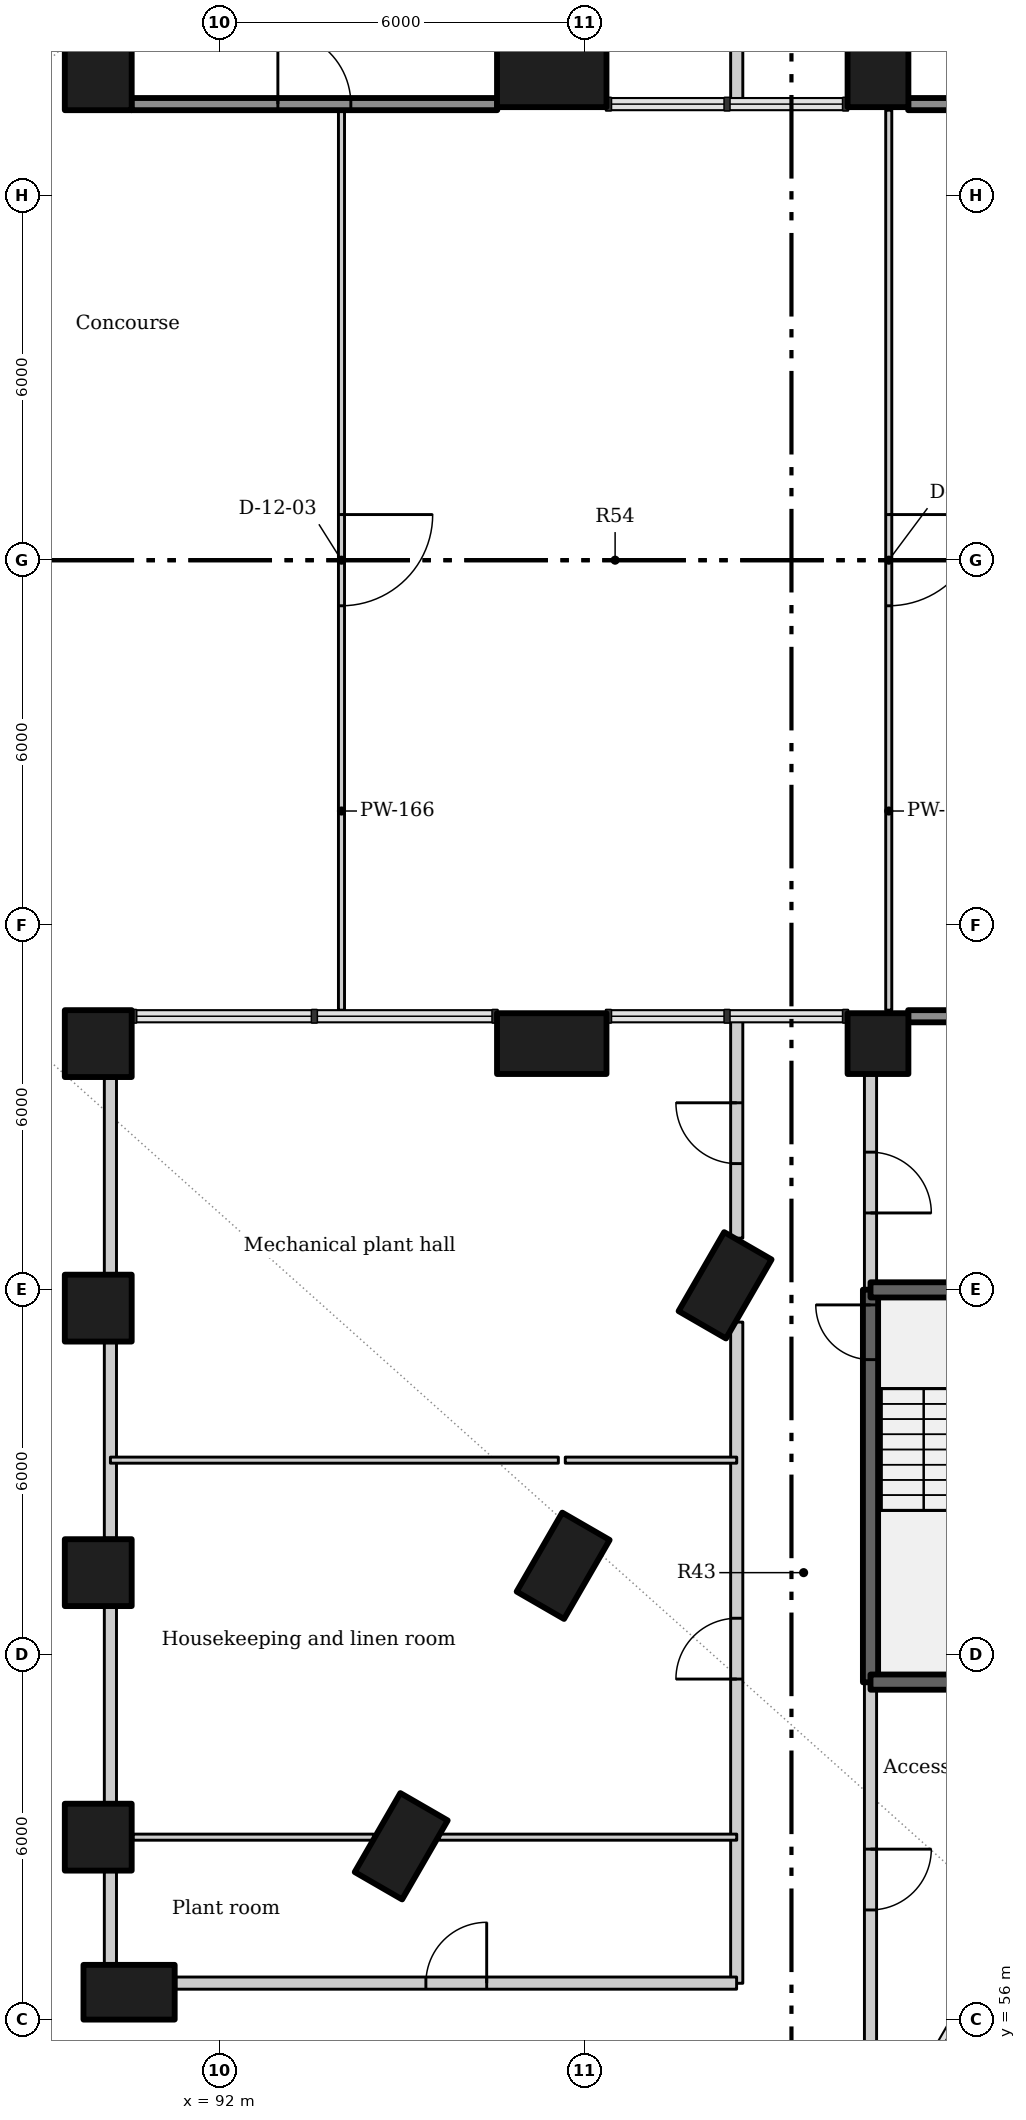
"""IFC4 building model, lengths in metres.
Left out: names, types, materials, properties, quantities, classifications, styles, units other than length and angle.
Written with IfcOpenShell. Run it as: python <this file> out.ifc"""

import sys

from ifc_helpers import new_model, si_unit, direction, frame, frame_2d, origin, origin_2d, place, context, subcontext, project, spatial, rectangle, extrude, element, fill, save


model = new_model("IFC4")
c1 = context("Model", 3, precision=1e-05, world=origin(), true_north=direction((0.0, 1.0)))
c2 = subcontext(c1, "Body", "Model", "MODEL_VIEW")
j1 = project(units=[si_unit("LENGTHUNIT", "METRE"), si_unit("PLANEANGLEUNIT", "RADIAN")], contexts=[c1])
p1 = place(None, origin())
s1 = spatial("IfcSite", under=j1, at=p1, CompositionType="ELEMENT")
p2 = place(p1, origin())
s2 = spatial("IfcBuilding", under=s1, at=p2, CompositionType="ELEMENT")
p3 = place(p2, origin())
s3 = spatial("IfcBuildingStorey", under=s2, at=p3, CompositionType="ELEMENT", Elevation=0.0)
for number, where, z_axis, x_axis in (
    (1, (90.507, 56.45, -1.8), (0.0, 0.0, 1.0), (1.0, 0.0, 0.0)),
    (2, (94.982, 58.851, -1.8), (0.0, 0.0, 1.0), (0.5, 0.866, 0.0)),
    (3, (97.646, 63.463, -1.8), (0.0, 0.0, 1.0), (0.5, 0.866, 0.0)),
    (4, (100.308, 68.075, -1.8), (0.0, 0.0, 1.0), (0.5, 0.866, 0.0)),
):
    element("IfcColumn", number, at=place(p3, frame(where, z_axis=z_axis, x_axis=x_axis)), inside=s3, PredefinedType="COLUMN", context=c2, shape_type="SweptSolid", body=[
        extrude(rectangle(XDim=1.5, YDim=0.9, at=origin_2d()), origin(), (0.0, 0.0, 1.0), 8.4),
    ])
for number, where, z_axis, x_axis in (
    (5, (90.0, 59.0, -1.8), (0.0, 0.0, 1.0), (0.0, 1.0, 0.0)),
    (6, (90.0, 63.35, -1.8), (0.0, 0.0, 1.0), (0.0, 1.0, 0.0)),
    (7, (90.0, 67.7, -1.8), (0.0, 0.0, 1.0), (0.0, 1.0, 0.0)),
    (8, (90.0, 72.05, -1.8), (0.0, 0.0, 1.0), (0.0, 1.0, 0.0)),
    (9, (90.0, 87.95, -1.8), (0.0, 0.0, 1.0), (0.0, 1.0, 0.0)),
):
    element("IfcColumn", number, at=place(p3, frame(where, z_axis=z_axis, x_axis=x_axis)), inside=s3, PredefinedType="COLUMN", context=c2, shape_type="SweptSolid", body=[
        extrude(rectangle(XDim=1.1, YDim=1.1, at=origin_2d()), origin(), (0.0, 0.0, 1.0), 8.4),
    ])
for number, where, z_axis, x_axis in (
    (10, (97.458, 87.95, -1.8), (0.0, 0.0, 1.0), (1.0, 0.0, 0.0)),
    (11, (97.458, 72.05, -1.8), (0.0, 0.0, 1.0), (1.0, 0.0, 0.0)),
):
    element("IfcColumn", number, at=place(p3, frame(where, z_axis=z_axis, x_axis=x_axis)), inside=s3, PredefinedType="COLUMN", context=c2, shape_type="SweptSolid", body=[
        extrude(rectangle(XDim=1.8, YDim=1.0, at=origin_2d()), origin(), (0.0, 0.0, 1.0), 8.4),
    ])
for number, where, z_axis, x_axis in (
    (12, (102.823, 87.95, -1.8), (0.0, 0.0, 1.0), (1.0, 0.0, 0.0)),
    (13, (102.823, 72.05, -1.8), (0.0, 0.0, 1.0), (1.0, 0.0, 0.0)),
):
    element("IfcColumn", number, at=place(p3, frame(where, z_axis=z_axis, x_axis=x_axis)), inside=s3, PredefinedType="COLUMN", context=c2, shape_type="SweptSolid", body=[
        extrude(rectangle(XDim=1.0, YDim=1.0, at=origin_2d()), origin(), (0.0, 0.0, 1.0), 8.4),
    ])
p4 = place(p3, frame((107.413, 72.5, 0.0), z_axis=(0.0, 0.0, 1.0), x_axis=(-1.0, 0.0, 0.0)))
e14 = element("IfcWall", 14, at=p4, inside=s3, PredefinedType="SOLIDWALL", context=c2, shape_type="SweptSolid", body=[
    extrude(rectangle(XDim=4.094, YDim=0.2, at=frame_2d((2.047, 0.0))), origin(), (0.0, 0.0, 1.0), 5.4),
])
p5 = place(p4, frame((0.847, 0.0, 0.0)))
e15 = element("IfcOpeningElement", 15, at=p5, cuts=e14, PredefinedType="OPENING", context=c2, shape_type="SweptSolid", body=[
    extrude(rectangle(XDim=2.4, YDim=2.7, at=frame_2d((1.2, 1.35))), frame((0.0, 0.11, 0.0), z_axis=(0.0, -1.0, 0.0), x_axis=(1.0, 0.0, 0.0)), (0.0, 0.0, 1.0), 0.22),
])
p6 = place(p3, frame((90.546, 87.5, 0.0), z_axis=(0.0, 0.0, 1.0), x_axis=(1.0, 0.0, 0.0)))
e16 = element("IfcWall", 16, at=p6, inside=s3, PredefinedType="SOLIDWALL", context=c2, shape_type="SweptSolid", body=[
    extrude(rectangle(XDim=6.016, YDim=0.2, at=frame_2d((3.008, 0.0))), origin(), (0.0, 0.0, 1.0), 5.4),
])
p7 = place(p6, frame((2.408, 0.0, 0.0)))
e17 = element("IfcOpeningElement", 17, at=p7, cuts=e16, PredefinedType="OPENING", context=c2, shape_type="SweptSolid", body=[
    extrude(rectangle(XDim=1.2, YDim=2.4, at=frame_2d((0.6, 1.2))), frame((0.0, 0.11, 0.0), z_axis=(0.0, -1.0, 0.0), x_axis=(1.0, 0.0, 0.0)), (0.0, 0.0, 1.0), 0.22),
])
p8 = place(p3, frame((103.319, 87.5, 0.0), z_axis=(0.0, 0.0, 1.0), x_axis=(1.0, 0.0, 0.0)))
e18 = element("IfcWall", 18, at=p8, inside=s3, PredefinedType="SOLIDWALL", context=c2, shape_type="SweptSolid", body=[
    extrude(rectangle(XDim=4.094, YDim=0.2, at=frame_2d((2.047, 0.0))), origin(), (0.0, 0.0, 1.0), 5.4),
])
p9 = place(p8, frame((0.847, 0.0, 0.0)))
e19 = element("IfcOpeningElement", 19, at=p9, cuts=e18, PredefinedType="OPENING", context=c2, shape_type="SweptSolid", body=[
    extrude(rectangle(XDim=2.4, YDim=2.7, at=frame_2d((1.2, 1.35))), frame((0.0, 0.11, 0.0), z_axis=(0.0, -1.0, 0.0), x_axis=(1.0, 0.0, 0.0)), (0.0, 0.0, 1.0), 0.22),
])
p10 = place(p3, frame((102.7, 61.547, -1.8), z_axis=(0.0, 0.0, 1.0), x_axis=(0.0, 1.0, 0.0)))
e20 = element("IfcWall", 20, at=p10, inside=s3, PredefinedType="SHEAR", context=c2, shape_type="SweptSolid", body=[
    extrude(rectangle(XDim=6.456, YDim=0.25, at=frame_2d((3.228, 0.0))), origin(), (0.0, 0.0, 1.0), 8.1),
])
p11 = place(p10, frame((5.306, 0.0, 1.8)))
e21 = element("IfcOpeningElement", 21, at=p11, cuts=e20, PredefinedType="OPENING", context=c2, shape_type="SweptSolid", body=[
    extrude(rectangle(XDim=0.9, YDim=2.1, at=frame_2d((0.45, 1.05))), frame((0.0, 0.135, 0.0), z_axis=(0.0, -1.0, 0.0), x_axis=(1.0, 0.0, 0.0)), (0.0, 0.0, 1.0), 0.27),
])
p12 = place(p3, frame((102.7, 61.553, 0.0), z_axis=(0.0, 0.0, 1.0), x_axis=(0.0, -1.0, 0.0)))
e22 = element("IfcWall", 22, at=p12, inside=s3, PredefinedType="PARTITIONING", context=c2, shape_type="SweptSolid", body=[
    extrude(rectangle(XDim=6.499, YDim=0.2, at=frame_2d((3.249, 0.0))), origin(), (0.0, 0.0, 1.0), 6.3),
])
p13 = place(p12, frame((2.75, 0.0, 0.0)))
e23 = element("IfcOpeningElement", 23, at=p13, cuts=e22, PredefinedType="OPENING", context=c2, shape_type="SweptSolid", body=[
    extrude(rectangle(XDim=1.0, YDim=2.1, at=frame_2d((0.5, 1.05))), frame((0.0, 0.11, 0.0), z_axis=(0.0, -1.0, 0.0), x_axis=(1.0, 0.0, 0.0)), (0.0, 0.0, 1.0), 0.22),
])
p14 = place(p3, frame((102.7, 71.533, 0.0), z_axis=(0.0, 0.0, 1.0), x_axis=(0.0, -1.0, 0.0)))
e24 = element("IfcWall", 24, at=p14, inside=s3, PredefinedType="PARTITIONING", context=c2, shape_type="SweptSolid", body=[
    extrude(rectangle(XDim=3.536, YDim=0.2, at=frame_2d((1.768, 0.0))), origin(), (0.0, 0.0, 1.0), 6.3),
])
p15 = place(p14, frame((1.268, 0.0, 0.0)))
e25 = element("IfcOpeningElement", 25, at=p15, cuts=e24, PredefinedType="OPENING", context=c2, shape_type="SweptSolid", body=[
    extrude(rectangle(XDim=1.0, YDim=2.1, at=frame_2d((0.5, 1.05))), frame((0.0, 0.11, 0.0), z_axis=(0.0, -1.0, 0.0), x_axis=(1.0, 0.0, 0.0)), (0.0, 0.0, 1.0), 0.22),
])
p16 = place(p3, frame((100.5, 56.597, 0.0), z_axis=(0.0, 0.0, 1.0), x_axis=(0.0, 1.0, 0.0)))
e26 = element("IfcWall", 26, at=p16, inside=s3, PredefinedType="PARTITIONING", context=c2, shape_type="SweptSolid", body=[
    extrude(rectangle(XDim=10.873, YDim=0.2, at=frame_2d((5.437, 0.0))), origin(), (0.0, 0.0, 1.0), 6.3),
])
p17 = place(p16, frame((5.003, 0.0, 0.0)))
e27 = element("IfcOpeningElement", 27, at=p17, cuts=e26, PredefinedType="OPENING", context=c2, shape_type="SweptSolid", body=[
    extrude(rectangle(XDim=1.0, YDim=2.1, at=frame_2d((0.5, 1.05))), frame((0.0, 0.11, 0.0), z_axis=(0.0, -1.0, 0.0), x_axis=(1.0, 0.0, 0.0)), (0.0, 0.0, 1.0), 0.22),
])
p18 = place(p3, frame((100.5, 68.851, 0.0), z_axis=(0.0, 0.0, 1.0), x_axis=(0.0, 1.0, 0.0)))
e28 = element("IfcWall", 28, at=p18, inside=s3, PredefinedType="PARTITIONING", context=c2, shape_type="SweptSolid", body=[
    extrude(rectangle(XDim=3.569, YDim=0.2, at=frame_2d((1.785, 0.0))), origin(), (0.0, 0.0, 1.0), 5.53),
])
p19 = place(p18, frame((1.226, 0.0, 0.0)))
e29 = element("IfcOpeningElement", 29, at=p19, cuts=e28, PredefinedType="OPENING", context=c2, shape_type="SweptSolid", body=[
    extrude(rectangle(XDim=1.0, YDim=2.1, at=frame_2d((0.5, 1.05))), frame((0.0, 0.11, 0.0), z_axis=(0.0, -1.0, 0.0), x_axis=(1.0, 0.0, 0.0)), (0.0, 0.0, 1.0), 0.22),
])
p20 = place(p3, frame((100.5, 87.58, 0.0), z_axis=(0.0, 0.0, 1.0), x_axis=(0.0, 1.0, 0.0)))
e30 = element("IfcWall", 30, at=p20, inside=s3, PredefinedType="PARTITIONING", context=c2, shape_type="SweptSolid", body=[
    extrude(rectangle(XDim=3.569, YDim=0.2, at=frame_2d((1.785, 0.0))), origin(), (0.0, 0.0, 1.0), 5.53),
])
p21 = place(p20, frame((1.343, 0.0, 0.0)))
e31 = element("IfcOpeningElement", 31, at=p21, cuts=e30, PredefinedType="OPENING", context=c2, shape_type="SweptSolid", body=[
    extrude(rectangle(XDim=1.0, YDim=2.1, at=frame_2d((0.5, 1.05))), frame((0.0, 0.11, 0.0), z_axis=(0.0, -1.0, 0.0), x_axis=(1.0, 0.0, 0.0)), (0.0, 0.0, 1.0), 0.22),
])
p22 = place(p3, frame((90.2, 56.917, 0.0), z_axis=(0.0, 0.0, 1.0), x_axis=(0.0, 1.0, 0.0)))
e32 = element("IfcWall", 32, at=p22, inside=s3, PredefinedType="PARTITIONING", context=c2, shape_type="SweptSolid", body=[
    extrude(rectangle(XDim=1.516, YDim=0.2, at=frame_2d((0.758, 0.0))), origin(), (0.0, 0.0, 1.0), 6.3),
])
for number, where, z_axis, x_axis in (
    (33, (90.2, 59.567, 0.0), (0.0, 0.0, 1.0), (0.0, 1.0, 0.0)),
    (34, (90.2, 63.917, 0.0), (0.0, 0.0, 1.0), (0.0, 1.0, 0.0)),
):
    element("IfcWall", number, at=place(p3, frame(where, z_axis=z_axis, x_axis=x_axis)), inside=s3, PredefinedType="PARTITIONING", context=c2, shape_type="SweptSolid", body=[
        extrude(rectangle(XDim=3.216, YDim=0.2, at=frame_2d((1.608, 0.0))), origin(), (0.0, 0.0, 1.0), 5.53),
    ])
p23 = place(p3, frame((90.2, 68.267, 0.0), z_axis=(0.0, 0.0, 1.0), x_axis=(0.0, 1.0, 0.0)))
e35 = element("IfcWall", 35, at=p23, inside=s3, PredefinedType="PARTITIONING", context=c2, shape_type="SweptSolid", body=[
    extrude(rectangle(XDim=3.216, YDim=0.2, at=frame_2d((1.608, 0.0))), origin(), (0.0, 0.0, 1.0), 5.53),
])
p24 = place(p3, frame((91.274, 56.6, 0.0), z_axis=(0.0, 0.0, 1.0), x_axis=(1.0, 0.0, 0.0)))
e36 = element("IfcWall", 36, at=p24, inside=s3, PredefinedType="PARTITIONING", context=c2, shape_type="SweptSolid", body=[
    extrude(rectangle(XDim=9.224, YDim=0.2, at=frame_2d((4.612, 0.0))), origin(), (0.0, 0.0, 1.0), 6.3),
])
p25 = place(p24, frame((4.114, 0.0, 0.0)))
e37 = element("IfcOpeningElement", 37, at=p25, cuts=e36, PredefinedType="OPENING", context=c2, shape_type="SweptSolid", body=[
    extrude(rectangle(XDim=1.0, YDim=2.1, at=frame_2d((0.5, 1.05))), frame((0.0, 0.11, 0.0), z_axis=(0.0, -1.0, 0.0), x_axis=(1.0, 0.0, 0.0)), (0.0, 0.0, 1.0), 0.22),
])
for number, where, z_axis, x_axis in (
    (38, (102.7, 68.0, -1.8), (0.0, 0.0, 1.0), (1.0, 0.0, 0.0)),
    (39, (102.7, 61.55, -1.8), (0.0, 0.0, 1.0), (1.0, 0.0, 0.0)),
):
    element("IfcWall", number, at=place(p3, frame(where, z_axis=z_axis, x_axis=x_axis)), inside=s3, PredefinedType="SHEAR", context=c2, shape_type="SweptSolid", body=[
        extrude(rectangle(XDim=3.45, YDim=0.25, at=frame_2d((1.725, 0.0))), origin(), (0.0, 0.0, 1.0), 8.1),
    ])
p26 = place(p3, frame((90.2, 65.2, 0.0), z_axis=(0.0, 0.0, 1.0), x_axis=(1.0, 0.0, 0.0)))
e40 = element("IfcWall", 40, at=p26, inside=s3, PredefinedType="PARTITIONING", context=c2, shape_type="SweptSolid", body=[
    extrude(rectangle(XDim=7.366, YDim=0.1, at=frame_2d((3.683, 0.0))), origin(), (0.0, 0.0, 1.0), 6.3),
])
p27 = place(p3, frame((97.68, 65.2, 0.0), z_axis=(0.0, 0.0, 1.0), x_axis=(1.0, 0.0, 0.0)))
e41 = element("IfcWall", 41, at=p27, inside=s3, PredefinedType="PARTITIONING", context=c2, shape_type="SweptSolid", body=[
    extrude(rectangle(XDim=2.82, YDim=0.1, at=frame_2d((1.41, 0.0))), origin(), (0.0, 0.0, 1.0), 5.38),
])
p28 = place(p3, frame((90.57, 59.0, 0.0), z_axis=(0.0, 0.0, 1.0), x_axis=(1.0, 0.0, 0.0)))
e42 = element("IfcWall", 42, at=p28, inside=s3, PredefinedType="PARTITIONING", context=c2, shape_type="SweptSolid", body=[
    extrude(rectangle(XDim=3.956, YDim=0.1, at=frame_2d((1.978, 0.0))), origin(), (0.0, 0.0, 1.0), 6.3),
])
p29 = place(p3, frame((95.612, 59.0, 0.0), z_axis=(0.0, 0.0, 1.0), x_axis=(1.0, 0.0, 0.0)))
e43 = element("IfcWall", 43, at=p29, inside=s3, PredefinedType="PARTITIONING", context=c2, shape_type="SweptSolid", body=[
    extrude(rectangle(XDim=4.888, YDim=0.1, at=frame_2d((2.444, 0.0))), origin(), (0.0, 0.0, 1.0), 6.3),
])
p30 = place(p3, frame((94.0, 87.4, 0.0), z_axis=(0.0, 0.0, 1.0), x_axis=(0.0, -1.0, 0.0)))
e44 = element("IfcWall", 44, at=p30, inside=s3, PredefinedType="PARTITIONING", context=c2, shape_type="SweptSolid", body=[
    extrude(rectangle(XDim=14.8, YDim=0.1, at=frame_2d((7.4, 0.0))), origin(), (0.0, 0.0, 1.0), 6.3),
])
p31 = place(p30, frame((6.65, 0.0, 0.0)))
e45 = element("IfcOpeningElement", 45, at=p31, cuts=e44, PredefinedType="OPENING", context=c2, shape_type="SweptSolid", body=[
    extrude(rectangle(XDim=1.5, YDim=2.1, at=frame_2d((0.75, 1.05))), frame((0.0, 0.06, 0.0), z_axis=(0.0, -1.0, 0.0), x_axis=(1.0, 0.0, 0.0)), (0.0, 0.0, 1.0), 0.12),
])
p32 = place(p3, frame((103.0, 87.4, 0.0), z_axis=(0.0, 0.0, 1.0), x_axis=(0.0, -1.0, 0.0)))
e46 = element("IfcWall", 46, at=p32, inside=s3, PredefinedType="PARTITIONING", context=c2, shape_type="SweptSolid", body=[
    extrude(rectangle(XDim=14.8, YDim=0.1, at=frame_2d((7.4, 0.0))), origin(), (0.0, 0.0, 1.0), 6.3),
])
p33 = place(p32, frame((6.65, 0.0, 0.0)))
e47 = element("IfcOpeningElement", 47, at=p33, cuts=e46, PredefinedType="OPENING", context=c2, shape_type="SweptSolid", body=[
    extrude(rectangle(XDim=1.5, YDim=2.1, at=frame_2d((0.75, 1.05))), frame((0.0, 0.06, 0.0), z_axis=(0.0, -1.0, 0.0), x_axis=(1.0, 0.0, 0.0)), (0.0, 0.0, 1.0), 0.12),
])
p34 = place(p7, origin())
e48 = element("IfcDoor", 48, at=p34, inside=s3, OperationType="SINGLE_SWING_LEFT", PredefinedType="DOOR", context=c2, shape_type="SweptSolid", body=[
    extrude(rectangle(XDim=1.2, YDim=2.4, at=frame_2d((0.6, 1.2))), frame((0.0, 0.025, 0.0), z_axis=(0.0, -1.0, 0.0), x_axis=(1.0, 0.0, 0.0)), (0.0, 0.0, 1.0), 0.05),
])
fill(e17, e48)
p35 = place(p11, origin())
e49 = element("IfcDoor", 49, at=p35, inside=s3, OperationType="SINGLE_SWING_RIGHT", PredefinedType="DOOR", context=c2, shape_type="SweptSolid", body=[
    extrude(rectangle(XDim=0.9, YDim=2.1, at=frame_2d((0.45, 1.05))), frame((0.0, 0.025, 0.0), z_axis=(0.0, -1.0, 0.0), x_axis=(1.0, 0.0, 0.0)), (0.0, 0.0, 1.0), 0.05),
])
fill(e21, e49)
p36 = place(p15, origin())
e50 = element("IfcDoor", 50, at=p36, inside=s3, OperationType="SINGLE_SWING_RIGHT", PredefinedType="DOOR", context=c2, shape_type="SweptSolid", body=[
    extrude(rectangle(XDim=1.0, YDim=2.1, at=frame_2d((0.5, 1.05))), frame((0.0, 0.025, 0.0), z_axis=(0.0, -1.0, 0.0), x_axis=(1.0, 0.0, 0.0)), (0.0, 0.0, 1.0), 0.05),
])
fill(e25, e50)
p37 = place(p13, origin())
e51 = element("IfcDoor", 51, at=p37, inside=s3, OperationType="SINGLE_SWING_LEFT", PredefinedType="DOOR", context=c2, shape_type="SweptSolid", body=[
    extrude(rectangle(XDim=1.0, YDim=2.1, at=frame_2d((0.5, 1.05))), frame((0.0, 0.025, 0.0), z_axis=(0.0, -1.0, 0.0), x_axis=(1.0, 0.0, 0.0)), (0.0, 0.0, 1.0), 0.05),
])
fill(e23, e51)
p38 = place(p19, origin())
e52 = element("IfcDoor", 52, at=p38, inside=s3, OperationType="SINGLE_SWING_RIGHT", PredefinedType="DOOR", context=c2, shape_type="SweptSolid", body=[
    extrude(rectangle(XDim=1.0, YDim=2.1, at=frame_2d((0.5, 1.05))), frame((0.0, 0.025, 0.0), z_axis=(0.0, -1.0, 0.0), x_axis=(1.0, 0.0, 0.0)), (0.0, 0.0, 1.0), 0.05),
])
fill(e29, e52)
p39 = place(p17, origin())
e53 = element("IfcDoor", 53, at=p39, inside=s3, OperationType="SINGLE_SWING_LEFT", PredefinedType="DOOR", context=c2, shape_type="SweptSolid", body=[
    extrude(rectangle(XDim=1.0, YDim=2.1, at=frame_2d((0.5, 1.05))), frame((0.0, 0.025, 0.0), z_axis=(0.0, -1.0, 0.0), x_axis=(1.0, 0.0, 0.0)), (0.0, 0.0, 1.0), 0.05),
])
fill(e27, e53)
p40 = place(p25, origin())
e54 = element("IfcDoor", 54, at=p40, inside=s3, OperationType="SINGLE_SWING_RIGHT", PredefinedType="DOOR", context=c2, shape_type="SweptSolid", body=[
    extrude(rectangle(XDim=1.0, YDim=2.1, at=frame_2d((0.5, 1.05))), frame((0.0, 0.025, 0.0), z_axis=(0.0, -1.0, 0.0), x_axis=(1.0, 0.0, 0.0)), (0.0, 0.0, 1.0), 0.05),
])
fill(e37, e54)
p41 = place(p31, origin())
e55 = element("IfcDoor", 55, at=p41, inside=s3, OperationType="DOUBLE_DOOR_SINGLE_SWING", PredefinedType="DOOR", context=c2, shape_type="SweptSolid", body=[
    extrude(rectangle(XDim=1.5, YDim=2.1, at=frame_2d((0.75, 1.05))), frame((0.0, 0.025, 0.0), z_axis=(0.0, -1.0, 0.0), x_axis=(1.0, 0.0, 0.0)), (0.0, 0.0, 1.0), 0.05),
])
fill(e45, e55)
p42 = place(p33, origin())
e56 = element("IfcDoor", 56, at=p42, inside=s3, OperationType="DOUBLE_DOOR_SINGLE_SWING", PredefinedType="DOOR", context=c2, shape_type="SweptSolid", body=[
    extrude(rectangle(XDim=1.5, YDim=2.1, at=frame_2d((0.75, 1.05))), frame((0.0, 0.025, 0.0), z_axis=(0.0, -1.0, 0.0), x_axis=(1.0, 0.0, 0.0)), (0.0, 0.0, 1.0), 0.05),
])
fill(e47, e56)
save(model, sys.argv[1])
